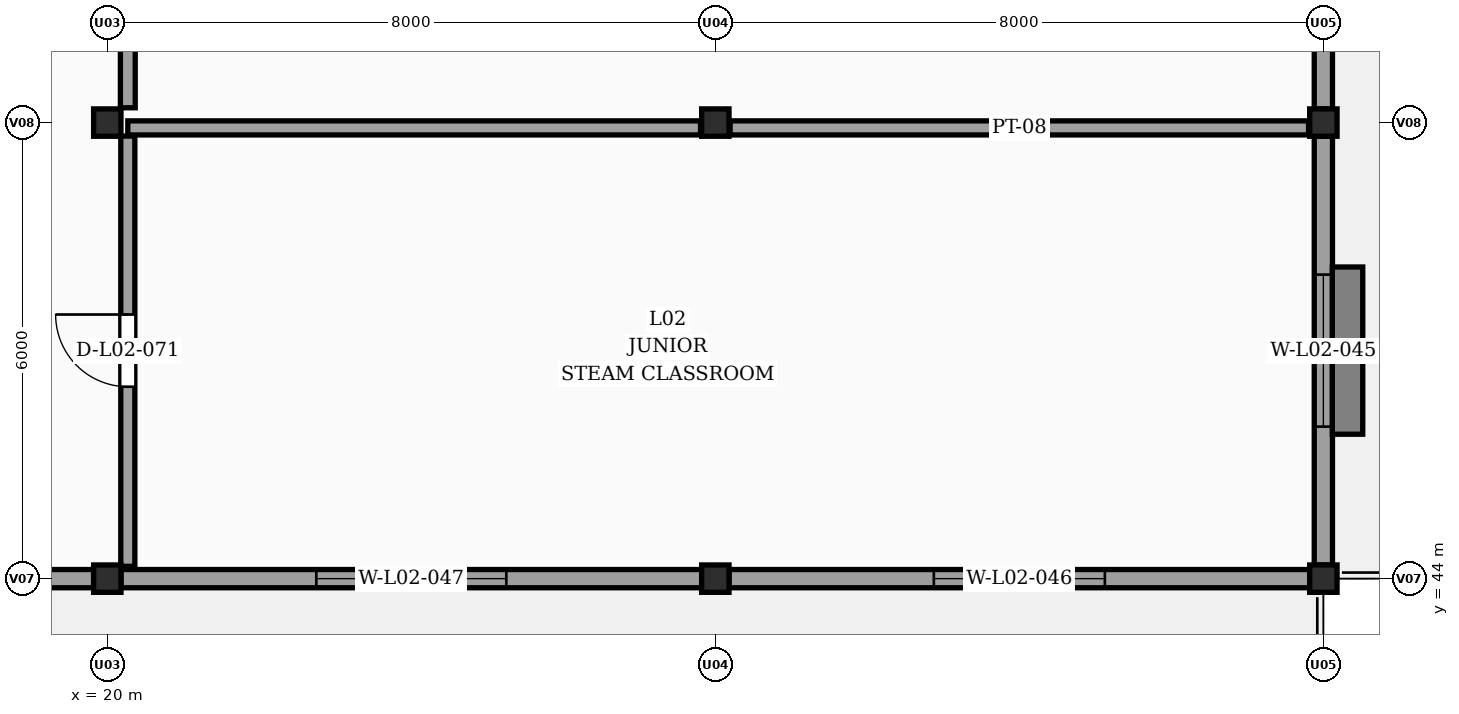
"""IFC4 building model, lengths in metres.
Left out: names, types, materials, properties, quantities, classifications, styles, units other than length and angle.
Written with IfcOpenShell. Run it as: python <this file> out.ifc"""

import sys

from ifc_helpers import new_model, si_unit, direction, frame, frame_2d, origin, origin_2d, place, context, subcontext, project, spatial, rectangle, extrude, element, fill, save


model = new_model("IFC4")
c1 = context("Model", 3, precision=1e-05, world=origin(), true_north=direction((0.0, 1.0)))
c2 = subcontext(c1, "Body", "Model", "MODEL_VIEW")
j1 = project(units=[si_unit("LENGTHUNIT", "METRE"), si_unit("PLANEANGLEUNIT", "RADIAN")], contexts=[c1])
p1 = place(None, origin())
s1 = spatial("IfcSite", under=j1, at=p1, CompositionType="ELEMENT")
p2 = place(p1, origin())
s2 = spatial("IfcBuilding", under=s1, at=p2, CompositionType="ELEMENT")
p3 = place(p2, frame((0.0, 0.0, 8.4)))
s3 = spatial("IfcBuildingStorey", under=s2, at=p3, CompositionType="ELEMENT", Elevation=8.4)
for number, where, z_axis, x_axis in (
    (1, (20.0, 44.0, 0.0), (0.0, 0.0, 1.0), (1.0, 0.0, 0.0)),
    (2, (20.0, 50.0, 0.0), (0.0, 0.0, 1.0), (1.0, 0.0, 0.0)),
    (3, (28.0, 44.0, 0.0), (0.0, 0.0, 1.0), (1.0, 0.0, 0.0)),
    (4, (28.0, 50.0, 0.0), (0.0, 0.0, 1.0), (1.0, 0.0, 0.0)),
    (5, (36.0, 44.0, 0.0), (0.0, 0.0, 1.0), (1.0, 0.0, 0.0)),
    (6, (36.0, 50.0, 0.0), (0.0, 0.0, 1.0), (1.0, 0.0, 0.0)),
):
    element("IfcColumn", number, at=place(p3, frame(where, z_axis=z_axis, x_axis=x_axis)), inside=s3, PredefinedType="COLUMN", context=c2, shape_type="SweptSolid", body=[
        extrude(rectangle(XDim=0.36, YDim=0.36, at=origin_2d()), origin(), (0.0, 0.0, 1.0), 3.9),
    ])
p4 = place(p3, frame((36.0, 55.82, 0.0), z_axis=(0.0, 0.0, 1.0), x_axis=(0.0, -1.0, 0.0)))
e7 = element("IfcWall", 7, at=p4, inside=s3, PredefinedType="SOLIDWALL", context=c2, shape_type="SweptSolid", body=[
    extrude(rectangle(XDim=5.64, YDim=0.24, at=frame_2d((2.82, 0.0))), origin(), (0.0, 0.0, 1.0), 3.088),
])
p5 = place(p4, frame((1.92, 0.0, 0.95)))
e8 = element("IfcOpeningElement", 8, at=p5, cuts=e7, PredefinedType="OPENING", context=c2, shape_type="SweptSolid", body=[
    extrude(rectangle(XDim=1.8, YDim=1.65, at=frame_2d((0.9, 0.825))), frame((0.0, 0.13, 0.0), z_axis=(0.0, -1.0, 0.0), x_axis=(1.0, 0.0, 0.0)), (0.0, 0.0, 1.0), 0.26),
])
p6 = place(p3, frame((36.0, 49.82, 0.0), z_axis=(0.0, 0.0, 1.0), x_axis=(0.0, -1.0, 0.0)))
e9 = element("IfcWall", 9, at=p6, inside=s3, PredefinedType="SOLIDWALL", context=c2, shape_type="SweptSolid", body=[
    extrude(rectangle(XDim=5.64, YDim=0.24, at=frame_2d((2.82, 0.0))), origin(), (0.0, 0.0, 1.0), 3.088),
])
p7 = place(p6, frame((1.82, 0.0, 0.95)))
e10 = element("IfcOpeningElement", 10, at=p7, cuts=e9, PredefinedType="OPENING", context=c2, shape_type="SweptSolid", body=[
    extrude(rectangle(XDim=2.0, YDim=1.65, at=frame_2d((1.0, 0.825))), frame((0.0, 0.13, 0.0), z_axis=(0.0, -1.0, 0.0), x_axis=(1.0, 0.0, 0.0)), (0.0, 0.0, 1.0), 0.26),
])
p8 = place(p3, frame((35.82, 44.0, 0.0), z_axis=(0.0, 0.0, 1.0), x_axis=(-1.0, 0.0, 0.0)))
e11 = element("IfcWall", 11, at=p8, inside=s3, PredefinedType="SOLIDWALL", context=c2, shape_type="SweptSolid", body=[
    extrude(rectangle(XDim=7.64, YDim=0.24, at=frame_2d((3.82, 0.0))), origin(), (0.0, 0.0, 1.0), 3.088),
])
p9 = place(p8, frame((2.695, 0.0, 0.95)))
e12 = element("IfcOpeningElement", 12, at=p9, cuts=e11, PredefinedType="OPENING", context=c2, shape_type="SweptSolid", body=[
    extrude(rectangle(XDim=2.25, YDim=1.65, at=frame_2d((1.125, 0.825))), frame((0.0, 0.13, 0.0), z_axis=(0.0, -1.0, 0.0), x_axis=(1.0, 0.0, 0.0)), (0.0, 0.0, 1.0), 0.26),
])
p10 = place(p3, frame((27.82, 44.0, 0.0), z_axis=(0.0, 0.0, 1.0), x_axis=(-1.0, 0.0, 0.0)))
e13 = element("IfcWall", 13, at=p10, inside=s3, PredefinedType="SOLIDWALL", context=c2, shape_type="SweptSolid", body=[
    extrude(rectangle(XDim=7.64, YDim=0.24, at=frame_2d((3.82, 0.0))), origin(), (0.0, 0.0, 1.0), 3.088),
])
p11 = place(p10, frame((2.57, 0.0, 0.95)))
e14 = element("IfcOpeningElement", 14, at=p11, cuts=e13, PredefinedType="OPENING", context=c2, shape_type="SweptSolid", body=[
    extrude(rectangle(XDim=2.5, YDim=1.65, at=frame_2d((1.25, 0.825))), frame((0.0, 0.13, 0.0), z_axis=(0.0, -1.0, 0.0), x_axis=(1.0, 0.0, 0.0)), (0.0, 0.0, 1.0), 0.26),
])
p12 = place(p3, frame((19.82, 44.0, 0.0), z_axis=(0.0, 0.0, 1.0), x_axis=(-1.0, 0.0, 0.0)))
e15 = element("IfcWall", 15, at=p12, inside=s3, PredefinedType="SOLIDWALL", context=c2, shape_type="SweptSolid", body=[
    extrude(rectangle(XDim=7.64, YDim=0.24, at=frame_2d((3.82, 0.0))), origin(), (0.0, 0.0, 1.0), 3.088),
])
p13 = place(p12, frame((4.3, 0.0, 0.0)))
e16 = element("IfcOpeningElement", 16, at=p13, cuts=e15, PredefinedType="OPENING", context=c2, shape_type="SweptSolid", body=[
    extrude(rectangle(XDim=1.2, YDim=2.15, at=frame_2d((0.6, 1.075))), frame((0.0, 0.13, 0.0), z_axis=(0.0, -1.0, 0.0), x_axis=(1.0, 0.0, 0.0)), (0.0, 0.0, 1.0), 0.26),
])
p14 = place(p3, frame((20.27, 49.93, 0.0), z_axis=(0.0, 0.0, 1.0), x_axis=(1.0, 0.0, 0.0)))
e17 = element("IfcWall", 17, at=p14, inside=s3, PredefinedType="PARTITIONING", context=c2, shape_type="SweptSolid", body=[
    extrude(rectangle(XDim=7.535, YDim=0.185, at=frame_2d((3.768, 0.0))), origin(), (0.0, 0.0, 1.0), 3.088),
])
p15 = place(p3, frame((28.195, 49.93, 0.0), z_axis=(0.0, 0.0, 1.0), x_axis=(1.0, 0.0, 0.0)))
e18 = element("IfcWall", 18, at=p15, inside=s3, PredefinedType="PARTITIONING", context=c2, shape_type="SweptSolid", body=[
    extrude(rectangle(XDim=7.61, YDim=0.185, at=frame_2d((3.805, 0.0))), origin(), (0.0, 0.0, 1.0), 3.088),
])
p16 = place(p3, frame((20.27, 44.162, 0.0), z_axis=(0.0, 0.0, 1.0), x_axis=(0.0, 1.0, 0.0)))
e19 = element("IfcWall", 19, at=p16, inside=s3, PredefinedType="PARTITIONING", context=c2, shape_type="SweptSolid", body=[
    extrude(rectangle(XDim=5.66, YDim=0.185, at=frame_2d((2.83, 0.0))), origin(), (0.0, 0.0, 1.0), 3.088),
])
p17 = place(p16, frame((2.363, 0.0, 0.0)))
e20 = element("IfcOpeningElement", 20, at=p17, cuts=e19, PredefinedType="OPENING", context=c2, shape_type="SweptSolid", body=[
    extrude(rectangle(XDim=0.95, YDim=2.1, at=frame_2d((0.475, 1.05))), frame((0.0, 0.103, 0.0), z_axis=(0.0, -1.0, 0.0), x_axis=(1.0, 0.0, 0.0)), (0.0, 0.0, 1.0), 0.205),
])
p18 = place(p3, frame((20.27, 50.195, 0.0), z_axis=(0.0, 0.0, 1.0), x_axis=(0.0, 1.0, 0.0)))
e21 = element("IfcWall", 21, at=p18, inside=s3, PredefinedType="PARTITIONING", context=c2, shape_type="SweptSolid", body=[
    extrude(rectangle(XDim=11.222, YDim=0.195, at=frame_2d((5.611, 0.0))), origin(), (0.0, 0.0, 1.0), 3.088),
])
p19 = place(p18, frame((7.315, 0.0, 0.0)))
e22 = element("IfcOpeningElement", 22, at=p19, cuts=e21, PredefinedType="OPENING", context=c2, shape_type="SweptSolid", body=[
    extrude(rectangle(XDim=0.98, YDim=2.1, at=frame_2d((0.49, 1.05))), frame((0.0, 0.107, 0.0), z_axis=(0.0, -1.0, 0.0), x_axis=(1.0, 0.0, 0.0)), (0.0, 0.0, 1.0), 0.215),
])
p20 = place(p7, origin())
e23 = element("IfcWindow", 23, at=p20, inside=s3, PartitioningType="DOUBLE_PANEL_VERTICAL", PredefinedType="WINDOW", context=c2, shape_type="SweptSolid", body=[
    extrude(rectangle(XDim=2.0, YDim=1.65, at=frame_2d((1.0, 0.825))), frame((0.0, 0.03, 0.0), z_axis=(0.0, -1.0, 0.0), x_axis=(1.0, 0.0, 0.0)), (0.0, 0.0, 1.0), 0.06),
])
fill(e10, e23)
p21 = place(p9, origin())
e24 = element("IfcWindow", 24, at=p21, inside=s3, PartitioningType="DOUBLE_PANEL_VERTICAL", PredefinedType="WINDOW", context=c2, shape_type="SweptSolid", body=[
    extrude(rectangle(XDim=2.25, YDim=1.65, at=frame_2d((1.125, 0.825))), frame((0.0, 0.03, 0.0), z_axis=(0.0, -1.0, 0.0), x_axis=(1.0, 0.0, 0.0)), (0.0, 0.0, 1.0), 0.06),
])
fill(e12, e24)
p22 = place(p11, origin())
e25 = element("IfcWindow", 25, at=p22, inside=s3, PartitioningType="DOUBLE_PANEL_VERTICAL", PredefinedType="WINDOW", context=c2, shape_type="SweptSolid", body=[
    extrude(rectangle(XDim=2.5, YDim=1.65, at=frame_2d((1.25, 0.825))), frame((0.0, 0.03, 0.0), z_axis=(0.0, -1.0, 0.0), x_axis=(1.0, 0.0, 0.0)), (0.0, 0.0, 1.0), 0.06),
])
fill(e14, e25)
p23 = place(p17, origin())
e26 = element("IfcDoor", 26, at=p23, inside=s3, OperationType="SINGLE_SWING_RIGHT", PredefinedType="DOOR", context=c2, shape_type="SweptSolid", body=[
    extrude(rectangle(XDim=0.95, YDim=2.1, at=frame_2d((0.475, 1.05))), frame((0.0, 0.025, 0.0), z_axis=(0.0, -1.0, 0.0), x_axis=(1.0, 0.0, 0.0)), (0.0, 0.0, 1.0), 0.05),
])
fill(e20, e26)
save(model, sys.argv[1])
